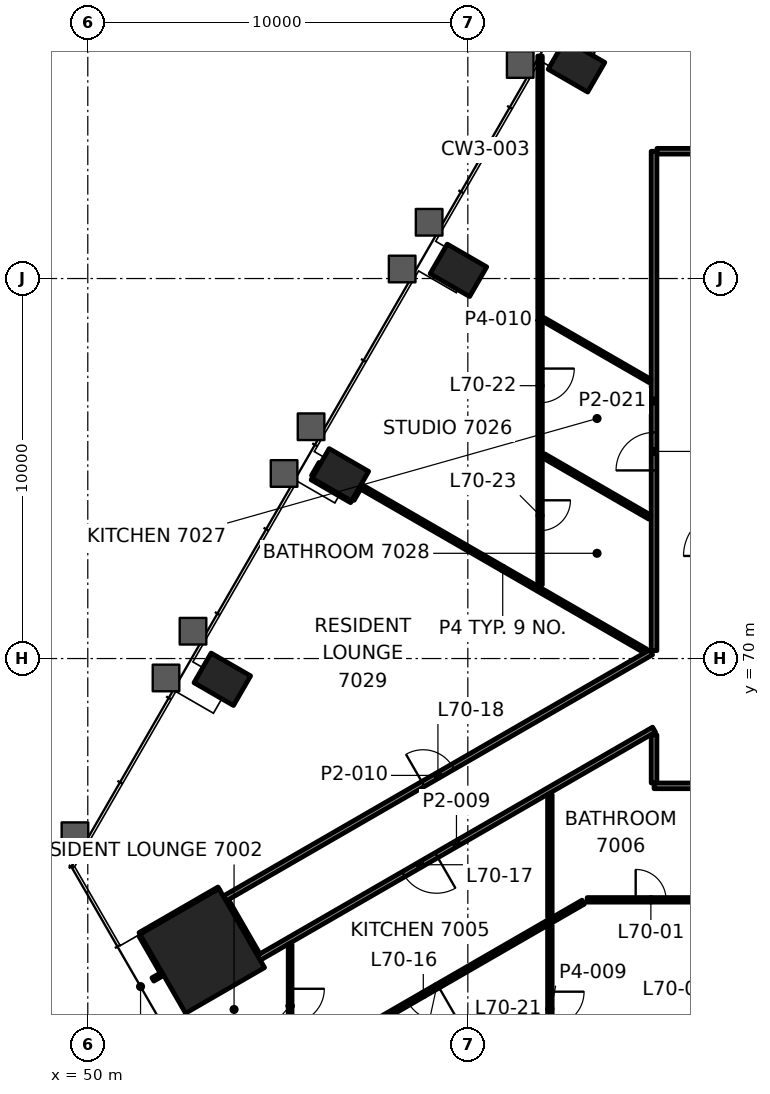
"""IFC4 building model, lengths in metres.
Left out: names, types, materials, properties, quantities, classifications, styles, units other than length and angle.
Written with IfcOpenShell. Run it as: python <this file> out.ifc"""

import sys

from ifc_helpers import new_model, si_unit, direction, frame, frame_2d, origin, origin_2d, place, context, subcontext, project, spatial, rectangle, hollow_rectangle, extrude, element, fill, save


model = new_model("IFC4")
c1 = context("Model", 3, precision=1e-05, world=origin(), true_north=direction((0.0, 1.0)))
c2 = subcontext(c1, "Body", "Model", "MODEL_VIEW")
j1 = project(units=[si_unit("LENGTHUNIT", "METRE"), si_unit("PLANEANGLEUNIT", "RADIAN")], contexts=[c1])
p1 = place(None, origin())
s1 = spatial("IfcSite", under=j1, at=p1, CompositionType="ELEMENT")
p2 = place(p1, origin())
s2 = spatial("IfcBuilding", under=s1, at=p2, CompositionType="ELEMENT")
p3 = place(p2, frame((0.0, 0.0, 291.6)))
s3 = spatial("IfcBuildingStorey", under=s2, at=p3, CompositionType="ELEMENT", Elevation=291.6)
p4 = place(p3, frame((53.012, 62.305, 0.0), z_axis=(0.0, 0.0, 1.0), x_axis=(0.5, -0.866025403784, 0.0)))
e1 = element("IfcColumn", 1, at=p4, inside=s3, PredefinedType="COLUMN", context=c2, shape_type="SweptSolid", body=[
    extrude(rectangle(XDim=2.4, YDim=2.4, at=origin_2d()), origin(), (0.0, 0.0, 1.0), 3.5),
])
for number, where, z_axis, x_axis in (
    (2, (62.859, 85.597, -0.0), (0.0, 0.0, 1.0), (-0.5, -0.866, 0.0)),
    (3, (59.753, 80.216, -0.0), (0.0, 0.0, 1.0), (-0.5, -0.866, 0.0)),
    (4, (56.646, 74.835, -0.0), (0.0, 0.0, 1.0), (-0.5, -0.866, 0.0)),
    (5, (53.539, 69.454, -0.0), (0.0, 0.0, 1.0), (-0.5, -0.866, 0.0)),
):
    element("IfcColumn", number, at=place(p3, frame(where, z_axis=z_axis, x_axis=x_axis)), inside=s3, PredefinedType="COLUMN", context=c2, shape_type="SweptSolid", body=[
        extrude(hollow_rectangle(XDim=0.9, YDim=1.2, WallThickness=0.06, at=origin_2d()), origin(), (0.0, 0.0, 1.0), 3.5),
    ])
p5 = place(p3, frame((63.141, 63.65, 0.0), z_axis=(0.0, 0.0, 1.0), x_axis=(1.0, 0.0, 0.0)))
e6 = element("IfcWall", 6, at=p5, inside=s3, PredefinedType="PARTITIONING", context=c2, shape_type="SweptSolid", body=[
    extrude(rectangle(XDim=23.718, YDim=0.12, at=frame_2d((11.859, 0.0))), origin(), (0.0, 0.0, 1.0), 2.7),
])
p6 = place(p5, frame((1.276, 0.0, 0.0)))
e7 = element("IfcOpeningElement", 7, at=p6, cuts=e6, PredefinedType="OPENING", context=c2, shape_type="SweptSolid", body=[
    extrude(rectangle(XDim=0.8, YDim=2.1, at=frame_2d((0.4, 1.05))), frame((0.0, 0.07, 0.0), z_axis=(0.0, -1.0, 0.0), x_axis=(1.0, 0.0, 0.0)), (0.0, 0.0, 1.0), 0.14),
])
p7 = place(p5, frame((3.43, 0.0, 0.0)))
e8 = element("IfcOpeningElement", 8, at=p7, cuts=e6, PredefinedType="OPENING", context=c2, shape_type="SweptSolid", body=[
    extrude(rectangle(XDim=0.9, YDim=2.1, at=frame_2d((0.45, 1.05))), frame((0.0, 0.07, 0.0), z_axis=(0.0, -1.0, 0.0), x_axis=(1.0, 0.0, 0.0)), (0.0, 0.0, 1.0), 0.14),
])
p8 = place(p5, frame((5.715, 0.0, 0.0)))
e9 = element("IfcOpeningElement", 9, at=p8, cuts=e6, PredefinedType="OPENING", context=c2, shape_type="SweptSolid", body=[
    extrude(rectangle(XDim=0.9, YDim=2.1, at=frame_2d((0.45, 1.05))), frame((0.0, 0.07, 0.0), z_axis=(0.0, -1.0, 0.0), x_axis=(1.0, 0.0, 0.0)), (0.0, 0.0, 1.0), 0.14),
])
p9 = place(p5, frame((8.87, 0.0, 0.0)))
e10 = element("IfcOpeningElement", 10, at=p9, cuts=e6, PredefinedType="OPENING", context=c2, shape_type="SweptSolid", body=[
    extrude(rectangle(XDim=0.8, YDim=2.1, at=frame_2d((0.4, 1.05))), frame((0.0, 0.07, 0.0), z_axis=(0.0, -1.0, 0.0), x_axis=(1.0, 0.0, 0.0)), (0.0, 0.0, 1.0), 0.14),
])
p10 = place(p5, frame((11.928, 0.0, 0.0)))
e11 = element("IfcOpeningElement", 11, at=p10, cuts=e6, PredefinedType="OPENING", context=c2, shape_type="SweptSolid", body=[
    extrude(rectangle(XDim=0.9, YDim=2.1, at=frame_2d((0.45, 1.05))), frame((0.0, 0.07, 0.0), z_axis=(0.0, -1.0, 0.0), x_axis=(1.0, 0.0, 0.0)), (0.0, 0.0, 1.0), 0.14),
])
p11 = place(p5, frame((15.083, 0.0, 0.0)))
e12 = element("IfcOpeningElement", 12, at=p11, cuts=e6, PredefinedType="OPENING", context=c2, shape_type="SweptSolid", body=[
    extrude(rectangle(XDim=0.8, YDim=2.1, at=frame_2d((0.4, 1.05))), frame((0.0, 0.07, 0.0), z_axis=(0.0, -1.0, 0.0), x_axis=(1.0, 0.0, 0.0)), (0.0, 0.0, 1.0), 0.14),
])
p12 = place(p5, frame((18.141, 0.0, 0.0)))
e13 = element("IfcOpeningElement", 13, at=p12, cuts=e6, PredefinedType="OPENING", context=c2, shape_type="SweptSolid", body=[
    extrude(rectangle(XDim=0.9, YDim=2.1, at=frame_2d((0.45, 1.05))), frame((0.0, 0.07, 0.0), z_axis=(0.0, -1.0, 0.0), x_axis=(1.0, 0.0, 0.0)), (0.0, 0.0, 1.0), 0.14),
])
p13 = place(p5, frame((21.297, 0.0, 0.0)))
e14 = element("IfcOpeningElement", 14, at=p13, cuts=e6, PredefinedType="OPENING", context=c2, shape_type="SweptSolid", body=[
    extrude(rectangle(XDim=0.8, YDim=2.1, at=frame_2d((0.4, 1.05))), frame((0.0, 0.07, 0.0), z_axis=(0.0, -1.0, 0.0), x_axis=(1.0, 0.0, 0.0)), (0.0, 0.0, 1.0), 0.14),
])
p14 = place(p3, frame((85.1, 66.65, 0.0), z_axis=(0.0, 0.0, 1.0), x_axis=(-1.0, 0.0, 0.0)))
e15 = element("IfcWall", 15, at=p14, inside=s3, PredefinedType="PARTITIONING", context=c2, shape_type="SweptSolid", body=[
    extrude(rectangle(XDim=20.2, YDim=0.15, at=frame_2d((10.1, 0.0))), origin(), (0.0, 0.0, 1.0), 2.7),
])
p15 = place(p14, frame((2.869, 0.0, 0.0)))
e16 = element("IfcOpeningElement", 16, at=p15, cuts=e15, PredefinedType="OPENING", context=c2, shape_type="SweptSolid", body=[
    extrude(rectangle(XDim=1.0, YDim=2.1, at=frame_2d((0.5, 1.05))), frame((0.0, 0.085, 0.0), z_axis=(0.0, -1.0, 0.0), x_axis=(1.0, 0.0, 0.0)), (0.0, 0.0, 1.0), 0.17),
])
p16 = place(p14, frame((9.082, 0.0, 0.0)))
e17 = element("IfcOpeningElement", 17, at=p16, cuts=e15, PredefinedType="OPENING", context=c2, shape_type="SweptSolid", body=[
    extrude(rectangle(XDim=1.0, YDim=2.1, at=frame_2d((0.5, 1.05))), frame((0.0, 0.085, 0.0), z_axis=(0.0, -1.0, 0.0), x_axis=(1.0, 0.0, 0.0)), (0.0, 0.0, 1.0), 0.17),
])
p17 = place(p14, frame((15.296, 0.0, 0.0)))
e18 = element("IfcOpeningElement", 18, at=p17, cuts=e15, PredefinedType="OPENING", context=c2, shape_type="SweptSolid", body=[
    extrude(rectangle(XDim=1.0, YDim=2.1, at=frame_2d((0.5, 1.05))), frame((0.0, 0.085, 0.0), z_axis=(0.0, -1.0, 0.0), x_axis=(1.0, 0.0, 0.0)), (0.0, 0.0, 1.0), 0.17),
])
p18 = place(p3, frame((64.977, 83.35, 0.0), z_axis=(0.0, 0.0, 1.0), x_axis=(1.0, 0.0, 0.0)))
e19 = element("IfcWall", 19, at=p18, inside=s3, PredefinedType="PARTITIONING", context=c2, shape_type="SweptSolid", body=[
    extrude(rectangle(XDim=6.823, YDim=0.15, at=frame_2d((3.412, 0.0))), origin(), (0.0, 0.0, 1.0), 2.7),
])
p19 = place(p18, frame((2.961, 0.0, 0.0)))
e20 = element("IfcOpeningElement", 20, at=p19, cuts=e19, PredefinedType="OPENING", context=c2, shape_type="SweptSolid", body=[
    extrude(rectangle(XDim=0.9, YDim=2.1, at=frame_2d((0.45, 1.05))), frame((0.0, 0.085, 0.0), z_axis=(0.0, -1.0, 0.0), x_axis=(1.0, 0.0, 0.0)), (0.0, 0.0, 1.0), 0.17),
])
p20 = place(p3, frame((63.037, 63.59, 0.0), z_axis=(0.0, 0.0, 1.0), x_axis=(-0.866021245731, -0.500007201891, 0.0)))
e21 = element("IfcWall", 21, at=p20, inside=s3, PredefinedType="PARTITIONING", context=c2, shape_type="SweptSolid", body=[
    extrude(rectangle(XDim=8.906, YDim=0.12, at=frame_2d((4.453, 0.0))), origin(), (0.0, 0.0, 1.0), 2.7),
])
p21 = place(p20, frame((4.41, 0.0, 0.0)))
e22 = element("IfcOpeningElement", 22, at=p21, cuts=e21, PredefinedType="OPENING", context=c2, shape_type="SweptSolid", body=[
    extrude(rectangle(XDim=0.9, YDim=2.1, at=frame_2d((0.45, 1.05))), frame((0.0, 0.07, 0.0), z_axis=(0.0, -1.0, 0.0), x_axis=(1.0, 0.0, 0.0)), (0.0, 0.0, 1.0), 0.14),
])
p22 = place(p3, frame((64.9, 68.13, 0.0), z_axis=(0.0, 0.0, 1.0), x_axis=(-0.866024746207, -0.500001138955, 0.0)))
e23 = element("IfcWall", 23, at=p22, inside=s3, PredefinedType="PARTITIONING", context=c2, shape_type="SweptSolid", body=[
    extrude(rectangle(XDim=12.007, YDim=0.15, at=frame_2d((6.003, 0.0))), origin(), (0.0, 0.0, 1.0), 2.547),
])
p23 = place(p22, frame((6.611, 0.0, 0.0)))
e24 = element("IfcOpeningElement", 24, at=p23, cuts=e23, PredefinedType="OPENING", context=c2, shape_type="SweptSolid", body=[
    extrude(rectangle(XDim=1.0, YDim=2.1, at=frame_2d((0.5, 1.05))), frame((0.0, 0.085, 0.0), z_axis=(0.0, -1.0, 0.0), x_axis=(1.0, 0.0, 0.0)), (0.0, 0.0, 1.0), 0.17),
])
p24 = place(p3, frame((51.713, 61.555, 0.0), z_axis=(0.0, 0.0, 1.0), x_axis=(0.866071776036, 0.499919672301, 0.0)))
e25 = element("IfcWall", 25, at=p24, inside=s3, PredefinedType="PARTITIONING", context=c2, shape_type="SweptSolid", body=[
    extrude(rectangle(XDim=0.25, YDim=0.1, at=frame_2d((0.125, 0.0))), origin(), (0.0, 0.0, 1.0), 2.7),
])
p25 = place(p3, frame((53.601, 63.685, 0.0), z_axis=(0.0, 0.0, 1.0), x_axis=(0.866024967991, 0.500000754816, 0.0)))
e26 = element("IfcWall", 26, at=p25, inside=s3, PredefinedType="PARTITIONING", context=c2, shape_type="SweptSolid", body=[
    extrude(rectangle(XDim=12.96, YDim=0.15, at=frame_2d((6.48, 0.0))), origin(), (0.0, 0.0, 1.0), 2.7),
])
p26 = place(p25, frame((6.03, 0.0, 0.0)))
e27 = element("IfcOpeningElement", 27, at=p26, cuts=e26, PredefinedType="OPENING", context=c2, shape_type="SweptSolid", body=[
    extrude(rectangle(XDim=0.9, YDim=2.1, at=frame_2d((0.45, 1.05))), frame((0.0, 0.085, 0.0), z_axis=(0.0, -1.0, 0.0), x_axis=(1.0, 0.0, 0.0)), (0.0, 0.0, 1.0), 0.17),
])
p27 = place(p3, frame((51.373, 62.745, 0.0), z_axis=(0.0, 0.0, 1.0), x_axis=(0.866036455013, 0.499980858223, 0.0)))
e28 = element("IfcWall", 28, at=p27, inside=s3, PredefinedType="PARTITIONING", context=c2, shape_type="SweptSolid", body=[
    extrude(rectangle(XDim=2.399, YDim=0.1, at=frame_2d((1.199, 0.0))), origin(), (0.0, 0.0, 1.0), 2.7),
])
p28 = place(p3, frame((56.966, 74.189, 0.0), z_axis=(0.0, 0.0, 1.0), x_axis=(0.499930013145, 0.866065806944, 0.0)))
e29 = element("IfcWall", 29, at=p28, inside=s3, PredefinedType="PARTITIONING", context=c2, shape_type="SweptSolid", body=[
    extrude(rectangle(XDim=0.339, YDim=0.1, at=frame_2d((0.17, 0.0))), origin(), (0.0, 0.0, 1.0), 2.7),
])
p29 = place(p3, frame((55.93, 74.794, 0.0), z_axis=(0.0, 0.0, 1.0), x_axis=(0.500080938595, 0.865978668822, 0.0)))
e30 = element("IfcWall", 30, at=p29, inside=s3, PredefinedType="PARTITIONING", context=c2, shape_type="SweptSolid", body=[
    extrude(rectangle(XDim=0.393, YDim=0.1, at=frame_2d((0.197, 0.0))), origin(), (0.0, 0.0, 1.0), 2.7),
])
p30 = place(p3, frame((64.9, 66.725, 0.0), z_axis=(0.0, 0.0, 1.0), x_axis=(0.0, 1.0, 0.0)))
e31 = element("IfcWall", 31, at=p30, inside=s3, PredefinedType="PARTITIONING", context=c2, shape_type="SweptSolid", body=[
    extrude(rectangle(XDim=1.268, YDim=0.15, at=frame_2d((0.634, 0.0))), origin(), (0.0, 0.0, 1.0), 2.547),
])
p31 = place(p3, frame((64.9, 70.208, 0.0), z_axis=(0.0, 0.0, 1.0), x_axis=(0.0, 1.0, 0.0)))
e32 = element("IfcWall", 32, at=p31, inside=s3, PredefinedType="PARTITIONING", context=c2, shape_type="SweptSolid", body=[
    extrude(rectangle(XDim=13.14, YDim=0.15, at=frame_2d((6.57, 0.0))), origin(), (0.0, 0.0, 1.0), 2.7),
])
p32 = place(p31, frame((4.743, 0.0, 0.0)))
e33 = element("IfcOpeningElement", 33, at=p32, cuts=e32, PredefinedType="OPENING", context=c2, shape_type="SweptSolid", body=[
    extrude(rectangle(XDim=1.0, YDim=2.1, at=frame_2d((0.5, 1.05))), frame((0.0, 0.085, 0.0), z_axis=(0.0, -1.0, 0.0), x_axis=(1.0, 0.0, 0.0)), (0.0, 0.0, 1.0), 0.17),
])
p33 = place(p3, frame((62.159, 62.979, 0.0), z_axis=(0.0, 0.0, 1.0), x_axis=(0.0, -1.0, 0.0)))
e34 = element("IfcWall", 34, at=p33, inside=s3, PredefinedType="PARTITIONING", context=c2, shape_type="SweptSolid", body=[
    extrude(rectangle(XDim=4.751, YDim=0.12, at=frame_2d((2.376, 0.0))), origin(), (0.0, 0.0, 1.0), 2.688),
])
p34 = place(p33, frame((1.746, 0.0, 0.0)))
e35 = element("IfcOpeningElement", 35, at=p34, cuts=e34, PredefinedType="OPENING", context=c2, shape_type="SweptSolid", body=[
    extrude(rectangle(XDim=0.9, YDim=2.1, at=frame_2d((0.45, 1.05))), frame((0.0, 0.07, 0.0), z_axis=(0.0, -1.0, 0.0), x_axis=(1.0, 0.0, 0.0)), (0.0, 0.0, 1.0), 0.14),
])
p35 = place(p3, frame((61.9, 85.855, 0.0), z_axis=(0.0, 0.0, 1.0), x_axis=(0.0, -1.0, 0.0)))
e36 = element("IfcWall", 36, at=p35, inside=s3, PredefinedType="PARTITIONING", context=c2, shape_type="SweptSolid", body=[
    extrude(rectangle(XDim=13.915, YDim=0.12, at=frame_2d((6.958, 0.0))), origin(), (0.0, 0.0, 1.0), 2.688),
])
p36 = place(p35, frame((8.224, 0.0, 0.0)))
e37 = element("IfcOpeningElement", 37, at=p36, cuts=e36, PredefinedType="OPENING", context=c2, shape_type="SweptSolid", body=[
    extrude(rectangle(XDim=0.9, YDim=2.1, at=frame_2d((0.45, 1.05))), frame((0.0, 0.07, 0.0), z_axis=(0.0, -1.0, 0.0), x_axis=(1.0, 0.0, 0.0)), (0.0, 0.0, 1.0), 0.14),
])
p37 = place(p35, frame((11.69, 0.0, 0.0)))
e38 = element("IfcOpeningElement", 38, at=p37, cuts=e36, PredefinedType="OPENING", context=c2, shape_type="SweptSolid", body=[
    extrude(rectangle(XDim=0.8, YDim=2.1, at=frame_2d((0.4, 1.05))), frame((0.0, 0.07, 0.0), z_axis=(0.0, -1.0, 0.0), x_axis=(1.0, 0.0, 0.0)), (0.0, 0.0, 1.0), 0.14),
])
p38 = place(p3, frame((54.464, 62.191, 0.0), z_axis=(0.0, 0.0, 1.0), x_axis=(-0.499988108725, 0.866032269107, 0.0)))
e39 = element("IfcWall", 39, at=p38, inside=s3, PredefinedType="PARTITIONING", context=c2, shape_type="SweptSolid", body=[
    extrude(rectangle(XDim=1.644, YDim=0.15, at=frame_2d((0.822, 0.0))), origin(), (0.0, 0.0, 1.0), 2.547),
])
p39 = place(p3, frame((51.973, 61.706, 0.0), z_axis=(0.0, 0.0, 1.0), x_axis=(-0.500022773673, 0.866012254999, 0.0)))
e40 = element("IfcWall", 40, at=p39, inside=s3, PredefinedType="PARTITIONING", context=c2, shape_type="SweptSolid", body=[
    extrude(rectangle(XDim=1.149, YDim=0.1, at=frame_2d((0.575, 0.0))), origin(), (0.0, 0.0, 1.0), 2.7),
])
p40 = place(p3, frame((64.799, 77.302, 0.0), z_axis=(0.0, 0.0, 1.0), x_axis=(-0.866000336211, 0.500043415797, 0.0)))
e41 = element("IfcWall", 41, at=p40, inside=s3, PredefinedType="PARTITIONING", context=c2, shape_type="SweptSolid", body=[
    extrude(rectangle(XDim=3.248, YDim=0.1, at=frame_2d((1.624, 0.0))), origin(), (0.0, 0.0, 1.0), 2.7),
])
p41 = place(p3, frame((64.791, 73.72, 0.0), z_axis=(0.0, 0.0, 1.0), x_axis=(-0.866033195618, 0.499986503906, 0.0)))
e42 = element("IfcWall", 42, at=p41, inside=s3, PredefinedType="PARTITIONING", context=c2, shape_type="SweptSolid", body=[
    extrude(rectangle(XDim=3.228, YDim=0.12, at=frame_2d((1.614, 0.0))), origin(), (0.0, 0.0, 1.0), 2.7),
])
p42 = place(p3, frame((64.67, 70.202, 0.0), z_axis=(0.0, 0.0, 1.0), x_axis=(-0.866027476775, 0.499996409458, 0.0)))
e43 = element("IfcWall", 43, at=p42, inside=s3, PredefinedType="PARTITIONING", context=c2, shape_type="SweptSolid", body=[
    extrude(rectangle(XDim=8.666, YDim=0.12, at=frame_2d((4.333, 0.0))), origin(), (0.0, 0.0, 1.0), 2.7),
])
p43 = place(p3, frame((56.94, 74.146, 0.0), z_axis=(0.0, 0.0, 1.0), x_axis=(-0.86611778647, 0.499839954345, 0.0)))
e44 = element("IfcWall", 44, at=p43, inside=s3, PredefinedType="PARTITIONING", context=c2, shape_type="SweptSolid", body=[
    extrude(rectangle(XDim=1.199, YDim=0.1, at=frame_2d((0.6, 0.0))), origin(), (0.0, 0.0, 1.0), 2.7),
])
p44 = place(p3, frame((62.159, 63.187, 0.0), z_axis=(0.0, 0.0, 1.0), x_axis=(0.0, 1.0, 0.0)))
e45 = element("IfcWall", 45, at=p44, inside=s3, PredefinedType="PARTITIONING", context=c2, shape_type="SweptSolid", body=[
    extrude(rectangle(XDim=3.233, YDim=0.12, at=frame_2d((1.617, 0.0))), origin(), (0.0, 0.0, 1.0), 2.547),
])
p45 = place(p3, frame((55.324, 62.484, 0.0), z_axis=(0.0, 0.0, 1.0), x_axis=(0.0, -1.0, 0.0)))
e46 = element("IfcWall", 46, at=p45, inside=s3, PredefinedType="PARTITIONING", context=c2, shape_type="SweptSolid", body=[
    extrude(rectangle(XDim=3.25, YDim=0.1, at=frame_2d((1.625, 0.0))), origin(), (0.0, 0.0, 1.0), 2.7),
])
p46 = place(p45, frame((1.175, 0.0, 0.0)))
e47 = element("IfcOpeningElement", 47, at=p46, cuts=e46, PredefinedType="OPENING", context=c2, shape_type="SweptSolid", body=[
    extrude(rectangle(XDim=0.9, YDim=2.1, at=frame_2d((0.45, 1.05))), frame((0.0, 0.06, 0.0), z_axis=(0.0, -1.0, 0.0), x_axis=(1.0, 0.0, 0.0)), (0.0, 0.0, 1.0), 0.12),
])
p47 = place(p6, origin())
e48 = element("IfcDoor", 48, at=p47, inside=s3, OperationType="SINGLE_SWING_RIGHT", PredefinedType="DOOR", context=c2, shape_type="SweptSolid", body=[
    extrude(rectangle(XDim=0.8, YDim=2.1, at=frame_2d((0.4, 1.05))), frame((0.0, 0.025, 0.0), z_axis=(0.0, -1.0, 0.0), x_axis=(1.0, 0.0, 0.0)), (0.0, 0.0, 1.0), 0.05),
])
fill(e7, e48)
p48 = place(p21, origin())
e49 = element("IfcDoor", 49, at=p48, inside=s3, OperationType="SINGLE_SWING_LEFT", PredefinedType="DOOR", context=c2, shape_type="SweptSolid", body=[
    extrude(rectangle(XDim=0.9, YDim=2.1, at=frame_2d((0.45, 1.05))), frame((0.0, 0.025, 0.0), z_axis=(0.0, -1.0, 0.0), x_axis=(1.0, 0.0, 0.0)), (0.0, 0.0, 1.0), 0.05),
])
fill(e22, e49)
p49 = place(p23, origin())
e50 = element("IfcDoor", 50, at=p49, inside=s3, OperationType="SINGLE_SWING_RIGHT", PredefinedType="DOOR", context=c2, shape_type="SweptSolid", body=[
    extrude(rectangle(XDim=1.0, YDim=2.1, at=frame_2d((0.5, 1.05))), frame((0.0, 0.025, 0.0), z_axis=(0.0, -1.0, 0.0), x_axis=(1.0, 0.0, 0.0)), (0.0, 0.0, 1.0), 0.05),
])
fill(e24, e50)
p50 = place(p26, origin())
e51 = element("IfcDoor", 51, at=p50, inside=s3, OperationType="SINGLE_SWING_RIGHT", PredefinedType="DOOR", context=c2, shape_type="SweptSolid", body=[
    extrude(rectangle(XDim=0.9, YDim=2.1, at=frame_2d((0.45, 1.05))), frame((0.0, 0.025, 0.0), z_axis=(0.0, -1.0, 0.0), x_axis=(1.0, 0.0, 0.0)), (0.0, 0.0, 1.0), 0.05),
])
fill(e27, e51)
p51 = place(p32, origin())
e52 = element("IfcDoor", 52, at=p51, inside=s3, OperationType="SINGLE_SWING_RIGHT", PredefinedType="DOOR", context=c2, shape_type="SweptSolid", body=[
    extrude(rectangle(XDim=1.0, YDim=2.1, at=frame_2d((0.5, 1.05))), frame((0.0, 0.025, 0.0), z_axis=(0.0, -1.0, 0.0), x_axis=(1.0, 0.0, 0.0)), (0.0, 0.0, 1.0), 0.05),
])
fill(e33, e52)
p52 = place(p34, origin())
e53 = element("IfcDoor", 53, at=p52, inside=s3, OperationType="SINGLE_SWING_LEFT", PredefinedType="DOOR", context=c2, shape_type="SweptSolid", body=[
    extrude(rectangle(XDim=0.9, YDim=2.1, at=frame_2d((0.45, 1.05))), frame((0.0, 0.025, 0.0), z_axis=(0.0, -1.0, 0.0), x_axis=(1.0, 0.0, 0.0)), (0.0, 0.0, 1.0), 0.05),
])
fill(e35, e53)
p53 = place(p36, origin())
e54 = element("IfcDoor", 54, at=p53, inside=s3, OperationType="SINGLE_SWING_RIGHT", PredefinedType="DOOR", context=c2, shape_type="SweptSolid", body=[
    extrude(rectangle(XDim=0.9, YDim=2.1, at=frame_2d((0.45, 1.05))), frame((0.0, 0.025, 0.0), z_axis=(0.0, -1.0, 0.0), x_axis=(1.0, 0.0, 0.0)), (0.0, 0.0, 1.0), 0.05),
])
fill(e37, e54)
p54 = place(p37, origin())
e55 = element("IfcDoor", 55, at=p54, inside=s3, OperationType="SINGLE_SWING_RIGHT", PredefinedType="DOOR", context=c2, shape_type="SweptSolid", body=[
    extrude(rectangle(XDim=0.8, YDim=2.1, at=frame_2d((0.4, 1.05))), frame((0.0, 0.025, 0.0), z_axis=(0.0, -1.0, 0.0), x_axis=(1.0, 0.0, 0.0)), (0.0, 0.0, 1.0), 0.05),
])
fill(e38, e55)
p55 = place(p46, origin())
e56 = element("IfcDoor", 56, at=p55, inside=s3, OperationType="SINGLE_SWING_RIGHT", PredefinedType="DOOR", context=c2, shape_type="SweptSolid", body=[
    extrude(rectangle(XDim=0.9, YDim=2.1, at=frame_2d((0.45, 1.05))), frame((0.0, 0.025, 0.0), z_axis=(0.0, -1.0, 0.0), x_axis=(1.0, 0.0, 0.0)), (0.0, 0.0, 1.0), 0.05),
])
fill(e47, e56)
save(model, sys.argv[1])
